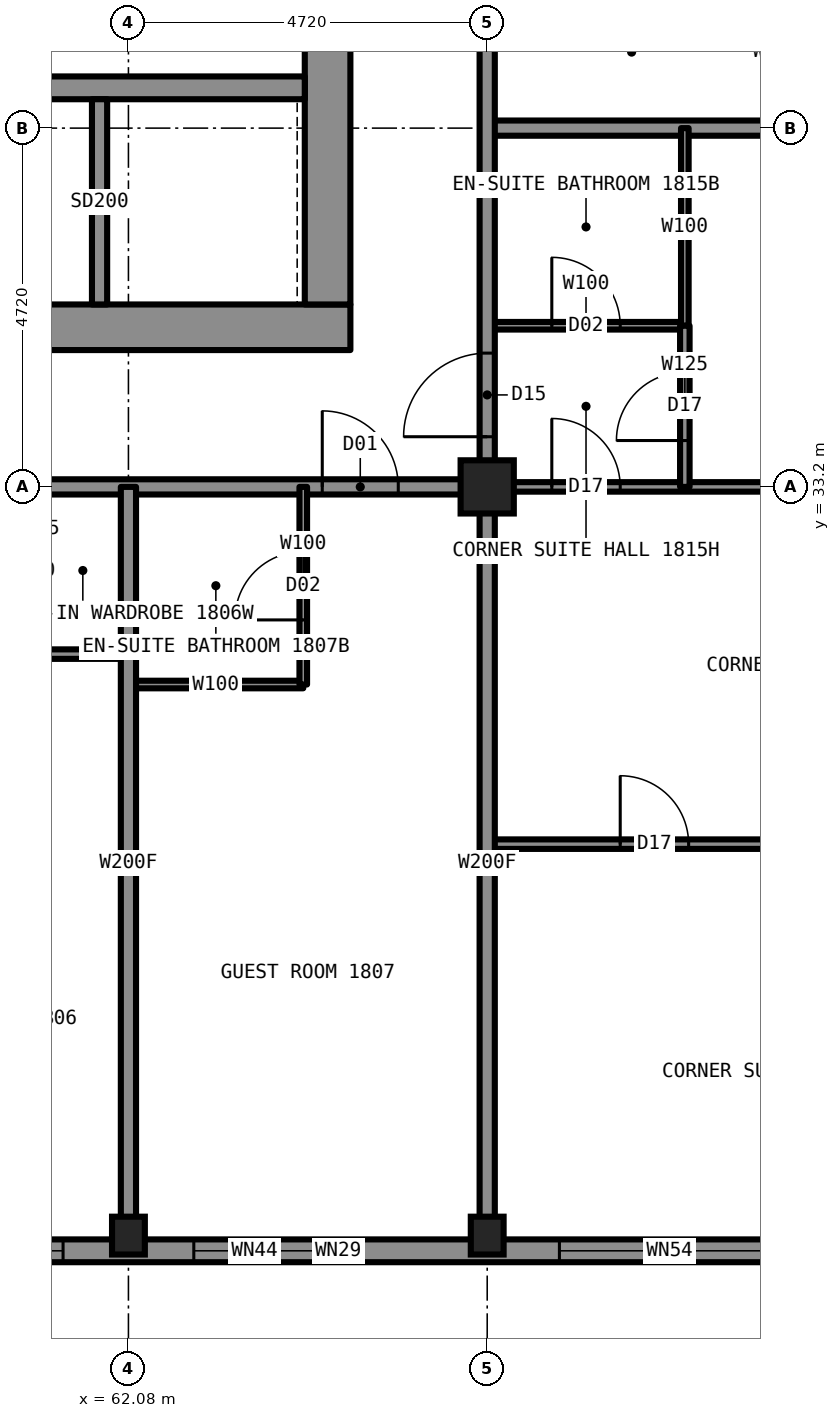
"""IFC4 building model, lengths in metres.
Left out: names, types, materials, properties, quantities, classifications, styles, units other than length and angle.
Written with IfcOpenShell. Run it as: python <this file> out.ifc"""

import sys

from ifc_helpers import new_model, si_unit, direction, frame, frame_2d, origin, origin_2d, place, context, subcontext, project, spatial, rectangle, hollow_rectangle, i_section, extrude, element, fill, save


model = new_model("IFC4")
c1 = context("Model", 3, precision=1e-05, world=origin(), true_north=direction((0.0, 1.0)))
c2 = subcontext(c1, "Body", "Model", "MODEL_VIEW")
j1 = project(units=[si_unit("LENGTHUNIT", "METRE"), si_unit("PLANEANGLEUNIT", "RADIAN")], contexts=[c1])
p1 = place(None, origin())
s1 = spatial("IfcSite", under=j1, at=p1, CompositionType="ELEMENT")
p2 = place(p1, origin())
s2 = spatial("IfcBuilding", under=s1, at=p2, CompositionType="ELEMENT")
p3 = place(p2, frame((0.0, 0.0, 70.5)))
s3 = spatial("IfcBuildingStorey", under=s2, at=p3, CompositionType="ELEMENT", Elevation=70.5)
for number, where, z_axis, x_axis in (
    (1, (62.08, 23.35, 0.0), (0.0, 0.0, 1.0), (1.0, 0.0, 0.0)),
    (2, (66.8, 23.35, 0.0), (0.0, 0.0, 1.0), (1.0, 0.0, 0.0)),
):
    element("IfcColumn", number, at=place(p3, frame(where, z_axis=z_axis, x_axis=x_axis)), inside=s3, PredefinedType="COLUMN", context=c2, shape_type="SweptSolid", body=[
        extrude(i_section(OverallWidth=0.432, OverallDepth=0.498, WebThickness=0.056, FlangeThickness=0.089, at=origin_2d()), origin(), (0.0, 0.0, 1.0), 3.5),
    ])
p4 = place(p3, frame((66.8, 33.2, 0.0), z_axis=(0.0, 0.0, 1.0), x_axis=(1.0, 0.0, 0.0)))
e3 = element("IfcColumn", 3, at=p4, inside=s3, PredefinedType="COLUMN", context=c2, shape_type="SweptSolid", body=[
    extrude(hollow_rectangle(XDim=0.7, YDim=0.7, WallThickness=0.06, at=origin_2d()), origin(), (0.0, 0.0, 1.0), 3.5),
])
p5 = place(p3, frame((45.0, 35.3, 0.0), z_axis=(0.0, 0.0, 1.0), x_axis=(1.0, 0.0, 0.0)))
e4 = element("IfcWall", 4, at=p5, inside=s3, PredefinedType="SHEAR", context=c2, shape_type="SweptSolid", body=[
    extrude(rectangle(XDim=20.0, YDim=0.6, at=frame_2d((10.0, 0.0))), origin(), (0.0, 0.0, 1.0), 3.5),
])
p6 = place(p3, frame((64.7, 35.6, 0.0), z_axis=(0.0, 0.0, 1.0), x_axis=(0.0, 1.0, 0.0)))
e5 = element("IfcWall", 5, at=p6, inside=s3, PredefinedType="SHEAR", context=c2, shape_type="SweptSolid", body=[
    extrude(rectangle(XDim=18.8, YDim=0.6, at=frame_2d((9.4, 0.0))), origin(), (0.0, 0.0, 1.0), 3.5),
])
p7 = place(p6, frame((13.4, 0.0, 0.0)))
e6 = element("IfcOpeningElement", 6, at=p7, cuts=e5, PredefinedType="OPENING", context=c2, shape_type="SweptSolid", body=[
    extrude(rectangle(XDim=1.8, YDim=2.2, at=frame_2d((0.9, 1.1))), frame((0.0, 0.31, 0.0), z_axis=(0.0, -1.0, 0.0), x_axis=(1.0, 0.0, 0.0)), (0.0, 0.0, 1.0), 0.62),
])
p8 = place(p6, frame((3.6, 0.0, 0.0)))
e7 = element("IfcOpeningElement", 7, at=p8, cuts=e5, PredefinedType="OPENING", context=c2, shape_type="SweptSolid", body=[
    extrude(rectangle(XDim=1.8, YDim=2.2, at=frame_2d((0.9, 1.1))), frame((0.0, 0.31, 0.0), z_axis=(0.0, -1.0, 0.0), x_axis=(1.0, 0.0, 0.0)), (0.0, 0.0, 1.0), 0.62),
])
p9 = place(p3, frame((45.6, 38.45, 0.0), z_axis=(0.0, 0.0, 1.0), x_axis=(1.0, 0.0, 0.0)))
e8 = element("IfcWall", 8, at=p9, inside=s3, PredefinedType="SHEAR", context=c2, shape_type="SweptSolid", body=[
    extrude(rectangle(XDim=18.8, YDim=0.3, at=frame_2d((9.4, 0.0))), origin(), (0.0, 0.0, 1.0), 3.5),
])
p10 = place(p3, frame((43.2, 33.2, 0.0), z_axis=(0.0, 0.0, 1.0), x_axis=(1.0, 0.0, 0.0)))
e9 = element("IfcWall", 9, at=p10, inside=s3, PredefinedType="PARTITIONING", context=c2, shape_type="SweptSolid", body=[
    extrude(rectangle(XDim=23.6, YDim=0.2, at=frame_2d((11.8, 0.0))), origin(), (0.0, 0.0, 1.0), 3.33),
])
p11 = place(p10, frame((2.55, 0.0, 0.0)))
e10 = element("IfcOpeningElement", 10, at=p11, cuts=e9, PredefinedType="OPENING", context=c2, shape_type="SweptSolid", body=[
    extrude(rectangle(XDim=1.0, YDim=2.2, at=frame_2d((0.5, 1.1))), frame((0.0, 0.11, 0.0), z_axis=(0.0, -1.0, 0.0), x_axis=(1.0, 0.0, 0.0)), (0.0, 0.0, 1.0), 0.22),
])
p12 = place(p10, frame((5.12, 0.0, 0.0)))
e11 = element("IfcOpeningElement", 11, at=p12, cuts=e9, PredefinedType="OPENING", context=c2, shape_type="SweptSolid", body=[
    extrude(rectangle(XDim=1.0, YDim=2.2, at=frame_2d((0.5, 1.1))), frame((0.0, 0.11, 0.0), z_axis=(0.0, -1.0, 0.0), x_axis=(1.0, 0.0, 0.0)), (0.0, 0.0, 1.0), 0.22),
])
p13 = place(p10, frame((11.7, 0.0, 0.0)))
e12 = element("IfcOpeningElement", 12, at=p13, cuts=e9, PredefinedType="OPENING", context=c2, shape_type="SweptSolid", body=[
    extrude(rectangle(XDim=1.0, YDim=2.2, at=frame_2d((0.5, 1.1))), frame((0.0, 0.11, 0.0), z_axis=(0.0, -1.0, 0.0), x_axis=(1.0, 0.0, 0.0)), (0.0, 0.0, 1.0), 0.22),
])
p14 = place(p10, frame((16.42, 0.0, 0.0)))
e13 = element("IfcOpeningElement", 13, at=p14, cuts=e9, PredefinedType="OPENING", context=c2, shape_type="SweptSolid", body=[
    extrude(rectangle(XDim=1.0, YDim=2.2, at=frame_2d((0.5, 1.1))), frame((0.0, 0.11, 0.0), z_axis=(0.0, -1.0, 0.0), x_axis=(1.0, 0.0, 0.0)), (0.0, 0.0, 1.0), 0.22),
])
p15 = place(p10, frame((21.43, 0.0, 0.0)))
e14 = element("IfcOpeningElement", 14, at=p15, cuts=e9, PredefinedType="OPENING", context=c2, shape_type="SweptSolid", body=[
    extrude(rectangle(XDim=1.0, YDim=2.2, at=frame_2d((0.5, 1.1))), frame((0.0, 0.11, 0.0), z_axis=(0.0, -1.0, 0.0), x_axis=(1.0, 0.0, 0.0)), (0.0, 0.0, 1.0), 0.22),
])
p16 = place(p3, frame((66.8, 33.2, 0.0), z_axis=(0.0, 0.0, 1.0), x_axis=(1.0, 0.0, 0.0)))
e15 = element("IfcWall", 15, at=p16, inside=s3, PredefinedType="PARTITIONING", context=c2, shape_type="SweptSolid", body=[
    extrude(rectangle(XDim=9.9, YDim=0.125, at=frame_2d((4.95, 0.0))), origin(), (0.0, 0.0, 1.0), 2.573),
])
p17 = place(p16, frame((0.85, 0.0, 0.0)))
e16 = element("IfcOpeningElement", 16, at=p17, cuts=e15, PredefinedType="OPENING", context=c2, shape_type="SweptSolid", body=[
    extrude(rectangle(XDim=0.9, YDim=2.2, at=frame_2d((0.45, 1.1))), frame((0.0, 0.073, 0.0), z_axis=(0.0, -1.0, 0.0), x_axis=(1.0, 0.0, 0.0)), (0.0, 0.0, 1.0), 0.145),
])
p18 = place(p3, frame((60.88, 31.0, 0.0), z_axis=(0.0, 0.0, 1.0), x_axis=(1.0, 0.0, 0.0)))
e17 = element("IfcWall", 17, at=p18, inside=s3, PredefinedType="PARTITIONING", context=c2, shape_type="SweptSolid", body=[
    extrude(rectangle(XDim=1.2, YDim=0.125, at=frame_2d((0.6, 0.0))), origin(), (0.0, 0.0, 1.0), 3.33),
])
p19 = place(p3, frame((62.08, 30.6, 0.0), z_axis=(0.0, 0.0, 1.0), x_axis=(1.0, 0.0, 0.0)))
e18 = element("IfcWall", 18, at=p19, inside=s3, PredefinedType="PARTITIONING", context=c2, shape_type="SweptSolid", body=[
    extrude(rectangle(XDim=2.3, YDim=0.1, at=frame_2d((1.15, 0.0))), origin(), (0.0, 0.0, 1.0), 3.33),
])
p20 = place(p3, frame((66.8, 28.5, 0.0), z_axis=(0.0, 0.0, 1.0), x_axis=(1.0, 0.0, 0.0)))
e19 = element("IfcWall", 19, at=p20, inside=s3, PredefinedType="PARTITIONING", context=c2, shape_type="SweptSolid", body=[
    extrude(rectangle(XDim=9.894, YDim=0.125, at=frame_2d((4.947, 0.0))), origin(), (0.0, 0.0, 1.0), 3.33),
])
p21 = place(p20, frame((1.75, 0.0, 0.0)))
e20 = element("IfcOpeningElement", 20, at=p21, cuts=e19, PredefinedType="OPENING", context=c2, shape_type="SweptSolid", body=[
    extrude(rectangle(XDim=0.9, YDim=2.2, at=frame_2d((0.45, 1.1))), frame((0.0, 0.073, 0.0), z_axis=(0.0, -1.0, 0.0), x_axis=(1.0, 0.0, 0.0)), (0.0, 0.0, 1.0), 0.145),
])
p22 = place(p3, frame((66.8, 37.92, 0.0), z_axis=(0.0, 0.0, 1.0), x_axis=(1.0, 0.0, 0.0)))
e21 = element("IfcWall", 21, at=p22, inside=s3, PredefinedType="PARTITIONING", context=c2, shape_type="SweptSolid", body=[
    extrude(rectangle(XDim=9.9, YDim=0.2, at=frame_2d((4.95, 0.0))), origin(), (0.0, 0.0, 1.0), 2.573),
])
p23 = place(p3, frame((66.8, 35.32, 0.0), z_axis=(0.0, 0.0, 1.0), x_axis=(1.0, 0.0, 0.0)))
e22 = element("IfcWall", 22, at=p23, inside=s3, PredefinedType="PARTITIONING", context=c2, shape_type="SweptSolid", body=[
    extrude(rectangle(XDim=2.6, YDim=0.1, at=frame_2d((1.3, 0.0))), origin(), (0.0, 0.0, 1.0), 3.33),
])
p24 = place(p23, frame((0.85, 0.0, 0.0)))
e23 = element("IfcOpeningElement", 23, at=p24, cuts=e22, PredefinedType="OPENING", context=c2, shape_type="SweptSolid", body=[
    extrude(rectangle(XDim=0.9, YDim=2.1, at=frame_2d((0.45, 1.05))), frame((0.0, 0.06, 0.0), z_axis=(0.0, -1.0, 0.0), x_axis=(1.0, 0.0, 0.0)), (0.0, 0.0, 1.0), 0.12),
])
p25 = place(p3, frame((66.8, 33.2, 0.0), z_axis=(0.0, 0.0, 1.0), x_axis=(0.0, 1.0, 0.0)))
e24 = element("IfcWall", 24, at=p25, inside=s3, PredefinedType="PARTITIONING", context=c2, shape_type="SweptSolid", body=[
    extrude(rectangle(XDim=23.6, YDim=0.2, at=frame_2d((11.8, 0.0))), origin(), (0.0, 0.0, 1.0), 3.33),
])
p26 = place(p25, frame((6.98, 0.0, 0.0)))
e25 = element("IfcOpeningElement", 25, at=p26, cuts=e24, PredefinedType="OPENING", context=c2, shape_type="SweptSolid", body=[
    extrude(rectangle(XDim=1.0, YDim=2.2, at=frame_2d((0.5, 1.1))), frame((0.0, 0.11, 0.0), z_axis=(0.0, -1.0, 0.0), x_axis=(1.0, 0.0, 0.0)), (0.0, 0.0, 1.0), 0.22),
])
p27 = place(p25, frame((12.44, 0.0, 0.0)))
e26 = element("IfcOpeningElement", 26, at=p27, cuts=e24, PredefinedType="OPENING", context=c2, shape_type="SweptSolid", body=[
    extrude(rectangle(XDim=1.0, YDim=2.2, at=frame_2d((0.5, 1.1))), frame((0.0, 0.11, 0.0), z_axis=(0.0, -1.0, 0.0), x_axis=(1.0, 0.0, 0.0)), (0.0, 0.0, 1.0), 0.22),
])
p28 = place(p25, frame((21.85, 0.0, 0.0)))
e27 = element("IfcOpeningElement", 27, at=p28, cuts=e24, PredefinedType="OPENING", context=c2, shape_type="SweptSolid", body=[
    extrude(rectangle(XDim=1.1, YDim=2.2, at=frame_2d((0.55, 1.1))), frame((0.0, 0.11, 0.0), z_axis=(0.0, -1.0, 0.0), x_axis=(1.0, 0.0, 0.0)), (0.0, 0.0, 1.0), 0.22),
])
p29 = place(p25, frame((0.66, 0.0, 0.0)))
e28 = element("IfcOpeningElement", 28, at=p29, cuts=e24, PredefinedType="OPENING", context=c2, shape_type="SweptSolid", body=[
    extrude(rectangle(XDim=1.1, YDim=2.2, at=frame_2d((0.55, 1.1))), frame((0.0, 0.11, 0.0), z_axis=(0.0, -1.0, 0.0), x_axis=(1.0, 0.0, 0.0)), (0.0, 0.0, 1.0), 0.22),
])
p30 = place(p3, frame((66.8, 23.3, 0.0), z_axis=(0.0, 0.0, 1.0), x_axis=(0.0, 1.0, 0.0)))
e29 = element("IfcWall", 29, at=p30, inside=s3, PredefinedType="PARTITIONING", context=c2, shape_type="SweptSolid", body=[
    extrude(rectangle(XDim=9.9, YDim=0.2, at=frame_2d((4.95, 0.0))), origin(), (0.0, 0.0, 1.0), 2.573),
])
p31 = place(p3, frame((69.4, 35.32, 0.0), z_axis=(0.0, 0.0, 1.0), x_axis=(0.0, 1.0, 0.0)))
e30 = element("IfcWall", 30, at=p31, inside=s3, PredefinedType="PARTITIONING", context=c2, shape_type="SweptSolid", body=[
    extrude(rectangle(XDim=2.6, YDim=0.1, at=frame_2d((1.3, 0.0))), origin(), (0.0, 0.0, 1.0), 3.33),
])
p32 = place(p3, frame((69.4, 33.2, 0.0), z_axis=(0.0, 0.0, 1.0), x_axis=(0.0, 1.0, 0.0)))
e31 = element("IfcWall", 31, at=p32, inside=s3, PredefinedType="PARTITIONING", context=c2, shape_type="SweptSolid", body=[
    extrude(rectangle(XDim=2.12, YDim=0.125, at=frame_2d((1.06, 0.0))), origin(), (0.0, 0.0, 1.0), 3.33),
])
p33 = place(p32, frame((0.61, 0.0, 0.0)))
e32 = element("IfcOpeningElement", 32, at=p33, cuts=e31, PredefinedType="OPENING", context=c2, shape_type="SweptSolid", body=[
    extrude(rectangle(XDim=0.9, YDim=2.2, at=frame_2d((0.45, 1.1))), frame((0.0, 0.073, 0.0), z_axis=(0.0, -1.0, 0.0), x_axis=(1.0, 0.0, 0.0)), (0.0, 0.0, 1.0), 0.145),
])
p34 = place(p3, frame((62.08, 23.3, 0.0), z_axis=(0.0, 0.0, 1.0), x_axis=(0.0, 1.0, 0.0)))
e33 = element("IfcWall", 33, at=p34, inside=s3, PredefinedType="PARTITIONING", context=c2, shape_type="SweptSolid", body=[
    extrude(rectangle(XDim=9.9, YDim=0.2, at=frame_2d((4.95, 0.0))), origin(), (0.0, 0.0, 1.0), 2.573),
])
p35 = place(p3, frame((64.38, 30.6, 0.0), z_axis=(0.0, 0.0, 1.0), x_axis=(0.0, 1.0, 0.0)))
e34 = element("IfcWall", 34, at=p35, inside=s3, PredefinedType="PARTITIONING", context=c2, shape_type="SweptSolid", body=[
    extrude(rectangle(XDim=2.6, YDim=0.1, at=frame_2d((1.3, 0.0))), origin(), (0.0, 0.0, 1.0), 3.33),
])
p36 = place(p35, frame((0.85, 0.0, 0.0)))
e35 = element("IfcOpeningElement", 35, at=p36, cuts=e34, PredefinedType="OPENING", context=c2, shape_type="SweptSolid", body=[
    extrude(rectangle(XDim=0.9, YDim=2.1, at=frame_2d((0.45, 1.05))), frame((0.0, 0.06, 0.0), z_axis=(0.0, -1.0, 0.0), x_axis=(1.0, 0.0, 0.0)), (0.0, 0.0, 1.0), 0.12),
])
p37 = place(p3, frame((38.5, 23.15, 0.0), z_axis=(0.0, 0.0, 1.0), x_axis=(1.0, 0.0, 0.0)))
e36 = element("IfcWall", 36, at=p37, inside=s3, PredefinedType="SOLIDWALL", context=c2, shape_type="SweptSolid", body=[
    extrude(rectangle(XDim=33.0, YDim=0.3, at=frame_2d((16.5, 0.0))), origin(), (0.0, 0.0, 1.0), 2.83),
])
p38 = place(p37, frame((0.85, 0.0, 0.5)))
e37 = element("IfcOpeningElement", 37, at=p38, cuts=e36, PredefinedType="OPENING", context=c2, shape_type="SweptSolid", body=[
    extrude(rectangle(XDim=2.9, YDim=2.0, at=frame_2d((1.45, 1.0))), frame((0.0, 0.16, 0.0), z_axis=(0.0, -1.0, 0.0), x_axis=(1.0, 0.0, 0.0)), (0.0, 0.0, 1.0), 0.32),
])
p39 = place(p37, frame((6.96, 0.0, 0.55)))
e38 = element("IfcOpeningElement", 38, at=p39, cuts=e36, PredefinedType="OPENING", context=c2, shape_type="SweptSolid", body=[
    extrude(rectangle(XDim=1.6, YDim=1.9, at=frame_2d((0.8, 0.95))), frame((0.0, 0.16, 0.0), z_axis=(0.0, -1.0, 0.0), x_axis=(1.0, 0.0, 0.0)), (0.0, 0.0, 1.0), 0.32),
])
p40 = place(p37, frame((10.28, 0.0, 0.5)))
e39 = element("IfcOpeningElement", 39, at=p40, cuts=e36, PredefinedType="OPENING", context=c2, shape_type="SweptSolid", body=[
    extrude(rectangle(XDim=3.0, YDim=2.0, at=frame_2d((1.5, 1.0))), frame((0.0, 0.16, 0.0), z_axis=(0.0, -1.0, 0.0), x_axis=(1.0, 0.0, 0.0)), (0.0, 0.0, 1.0), 0.32),
])
p41 = place(p37, frame((15.0, 0.0, 0.5)))
e40 = element("IfcOpeningElement", 40, at=p41, cuts=e36, PredefinedType="OPENING", context=c2, shape_type="SweptSolid", body=[
    extrude(rectangle(XDim=3.0, YDim=2.0, at=frame_2d((1.5, 1.0))), frame((0.0, 0.16, 0.0), z_axis=(0.0, -1.0, 0.0), x_axis=(1.0, 0.0, 0.0)), (0.0, 0.0, 1.0), 0.32),
])
p42 = place(p37, frame((19.72, 0.0, 0.5)))
e41 = element("IfcOpeningElement", 41, at=p42, cuts=e36, PredefinedType="OPENING", context=c2, shape_type="SweptSolid", body=[
    extrude(rectangle(XDim=3.0, YDim=2.0, at=frame_2d((1.5, 1.0))), frame((0.0, 0.16, 0.0), z_axis=(0.0, -1.0, 0.0), x_axis=(1.0, 0.0, 0.0)), (0.0, 0.0, 1.0), 0.32),
])
p43 = place(p37, frame((24.44, 0.0, 0.55)))
e42 = element("IfcOpeningElement", 42, at=p43, cuts=e36, PredefinedType="OPENING", context=c2, shape_type="SweptSolid", body=[
    extrude(rectangle(XDim=1.6, YDim=1.9, at=frame_2d((0.8, 0.95))), frame((0.0, 0.16, 0.0), z_axis=(0.0, -1.0, 0.0), x_axis=(1.0, 0.0, 0.0)), (0.0, 0.0, 1.0), 0.32),
])
p44 = place(p37, frame((29.25, 0.0, 0.5)))
e43 = element("IfcOpeningElement", 43, at=p44, cuts=e36, PredefinedType="OPENING", context=c2, shape_type="SweptSolid", body=[
    extrude(rectangle(XDim=2.9, YDim=2.0, at=frame_2d((1.45, 1.0))), frame((0.0, 0.16, 0.0), z_axis=(0.0, -1.0, 0.0), x_axis=(1.0, 0.0, 0.0)), (0.0, 0.0, 1.0), 0.32),
])
p45 = place(p37, frame((6.31, 0.0, 1.45)))
e44 = element("IfcOpeningElement", 44, at=p45, cuts=e36, PredefinedType="OPENING", context=c2, shape_type="SweptSolid", body=[
    extrude(rectangle(XDim=0.6, YDim=1.0, at=frame_2d((0.3, 0.5))), frame((0.0, 0.16, 0.0), z_axis=(0.0, -1.0, 0.0), x_axis=(1.0, 0.0, 0.0)), (0.0, 0.0, 1.0), 0.32),
])
p46 = place(p37, frame((26.04, 0.0, 1.45)))
e45 = element("IfcOpeningElement", 45, at=p46, cuts=e36, PredefinedType="OPENING", context=c2, shape_type="SweptSolid", body=[
    extrude(rectangle(XDim=0.6, YDim=1.0, at=frame_2d((0.3, 0.5))), frame((0.0, 0.16, 0.0), z_axis=(0.0, -1.0, 0.0), x_axis=(1.0, 0.0, 0.0)), (0.0, 0.0, 1.0), 0.32),
])
p47 = place(p3, frame((61.7, 35.6, 0.0), z_axis=(0.0, 0.0, 1.0), x_axis=(0.0, 1.0, 0.0)))
e46 = element("IfcWall", 46, at=p47, inside=s3, PredefinedType="PARTITIONING", context=c2, shape_type="SweptSolid", body=[
    extrude(rectangle(XDim=2.7, YDim=0.2, at=frame_2d((1.35, 0.0))), origin(), (0.0, 0.0, 1.0), 3.33),
])
p48 = place(p15, origin())
e47 = element("IfcDoor", 47, at=p48, inside=s3, OperationType="SINGLE_SWING_LEFT", PredefinedType="DOOR", context=c2, shape_type="SweptSolid", body=[
    extrude(rectangle(XDim=1.0, YDim=2.2, at=frame_2d((0.5, 1.1))), frame((0.0, 0.025, 0.0), z_axis=(0.0, -1.0, 0.0), x_axis=(1.0, 0.0, 0.0)), (0.0, 0.0, 1.0), 0.05),
])
fill(e14, e47)
p49 = place(p36, origin())
e48 = element("IfcDoor", 48, at=p49, inside=s3, OperationType="SINGLE_SWING_RIGHT", PredefinedType="DOOR", context=c2, shape_type="SweptSolid", body=[
    extrude(rectangle(XDim=0.9, YDim=2.1, at=frame_2d((0.45, 1.05))), frame((0.0, 0.025, 0.0), z_axis=(0.0, -1.0, 0.0), x_axis=(1.0, 0.0, 0.0)), (0.0, 0.0, 1.0), 0.05),
])
fill(e35, e48)
p50 = place(p17, origin())
e49 = element("IfcDoor", 49, at=p50, inside=s3, OperationType="SINGLE_SWING_LEFT", PredefinedType="DOOR", context=c2, shape_type="SweptSolid", body=[
    extrude(rectangle(XDim=0.9, YDim=2.2, at=frame_2d((0.45, 1.1))), frame((0.0, 0.025, 0.0), z_axis=(0.0, -1.0, 0.0), x_axis=(1.0, 0.0, 0.0)), (0.0, 0.0, 1.0), 0.05),
])
fill(e16, e49)
p51 = place(p24, origin())
e50 = element("IfcDoor", 50, at=p51, inside=s3, OperationType="SINGLE_SWING_RIGHT", PredefinedType="DOOR", context=c2, shape_type="SweptSolid", body=[
    extrude(rectangle(XDim=0.9, YDim=2.1, at=frame_2d((0.45, 1.05))), frame((0.0, 0.025, 0.0), z_axis=(0.0, -1.0, 0.0), x_axis=(1.0, 0.0, 0.0)), (0.0, 0.0, 1.0), 0.05),
])
fill(e23, e50)
p52 = place(p29, origin())
e51 = element("IfcDoor", 51, at=p52, inside=s3, OperationType="SINGLE_SWING_LEFT", PredefinedType="DOOR", context=c2, shape_type="SweptSolid", body=[
    extrude(rectangle(XDim=1.1, YDim=2.2, at=frame_2d((0.55, 1.1))), frame((0.0, 0.025, 0.0), z_axis=(0.0, -1.0, 0.0), x_axis=(1.0, 0.0, 0.0)), (0.0, 0.0, 1.0), 0.05),
])
fill(e28, e51)
p53 = place(p21, origin())
e52 = element("IfcDoor", 52, at=p53, inside=s3, OperationType="SINGLE_SWING_LEFT", PredefinedType="DOOR", context=c2, shape_type="SweptSolid", body=[
    extrude(rectangle(XDim=0.9, YDim=2.2, at=frame_2d((0.45, 1.1))), frame((0.0, 0.025, 0.0), z_axis=(0.0, -1.0, 0.0), x_axis=(1.0, 0.0, 0.0)), (0.0, 0.0, 1.0), 0.05),
])
fill(e20, e52)
p54 = place(p33, origin())
e53 = element("IfcDoor", 53, at=p54, inside=s3, OperationType="SINGLE_SWING_LEFT", PredefinedType="DOOR", context=c2, shape_type="SweptSolid", body=[
    extrude(rectangle(XDim=0.9, YDim=2.2, at=frame_2d((0.45, 1.1))), frame((0.0, 0.025, 0.0), z_axis=(0.0, -1.0, 0.0), x_axis=(1.0, 0.0, 0.0)), (0.0, 0.0, 1.0), 0.05),
])
fill(e32, e53)
p55 = place(p42, origin())
e54 = element("IfcWindow", 54, at=p55, inside=s3, PartitioningType="SINGLE_PANEL", PredefinedType="WINDOW", context=c2, shape_type="SweptSolid", body=[
    extrude(rectangle(XDim=3.0, YDim=2.0, at=frame_2d((1.5, 1.0))), frame((0.0, 0.03, 0.0), z_axis=(0.0, -1.0, 0.0), x_axis=(1.0, 0.0, 0.0)), (0.0, 0.0, 1.0), 0.06),
])
fill(e41, e54)
p56 = place(p43, origin())
e55 = element("IfcWindow", 55, at=p56, inside=s3, PartitioningType="SINGLE_PANEL", PredefinedType="WINDOW", context=c2, shape_type="SweptSolid", body=[
    extrude(rectangle(XDim=1.6, YDim=1.9, at=frame_2d((0.8, 0.95))), frame((0.0, 0.03, 0.0), z_axis=(0.0, -1.0, 0.0), x_axis=(1.0, 0.0, 0.0)), (0.0, 0.0, 1.0), 0.06),
])
fill(e42, e55)
p57 = place(p44, origin())
e56 = element("IfcWindow", 56, at=p57, inside=s3, PartitioningType="SINGLE_PANEL", PredefinedType="WINDOW", context=c2, shape_type="SweptSolid", body=[
    extrude(rectangle(XDim=2.9, YDim=2.0, at=frame_2d((1.45, 1.0))), frame((0.0, 0.03, 0.0), z_axis=(0.0, -1.0, 0.0), x_axis=(1.0, 0.0, 0.0)), (0.0, 0.0, 1.0), 0.06),
])
fill(e43, e56)
p58 = place(p46, origin())
e57 = element("IfcWindow", 57, at=p58, inside=s3, PartitioningType="SINGLE_PANEL", PredefinedType="WINDOW", context=c2, shape_type="SweptSolid", body=[
    extrude(rectangle(XDim=0.6, YDim=1.0, at=frame_2d((0.3, 0.5))), frame((0.0, 0.03, 0.0), z_axis=(0.0, -1.0, 0.0), x_axis=(1.0, 0.0, 0.0)), (0.0, 0.0, 1.0), 0.06),
])
fill(e45, e57)
save(model, sys.argv[1])
